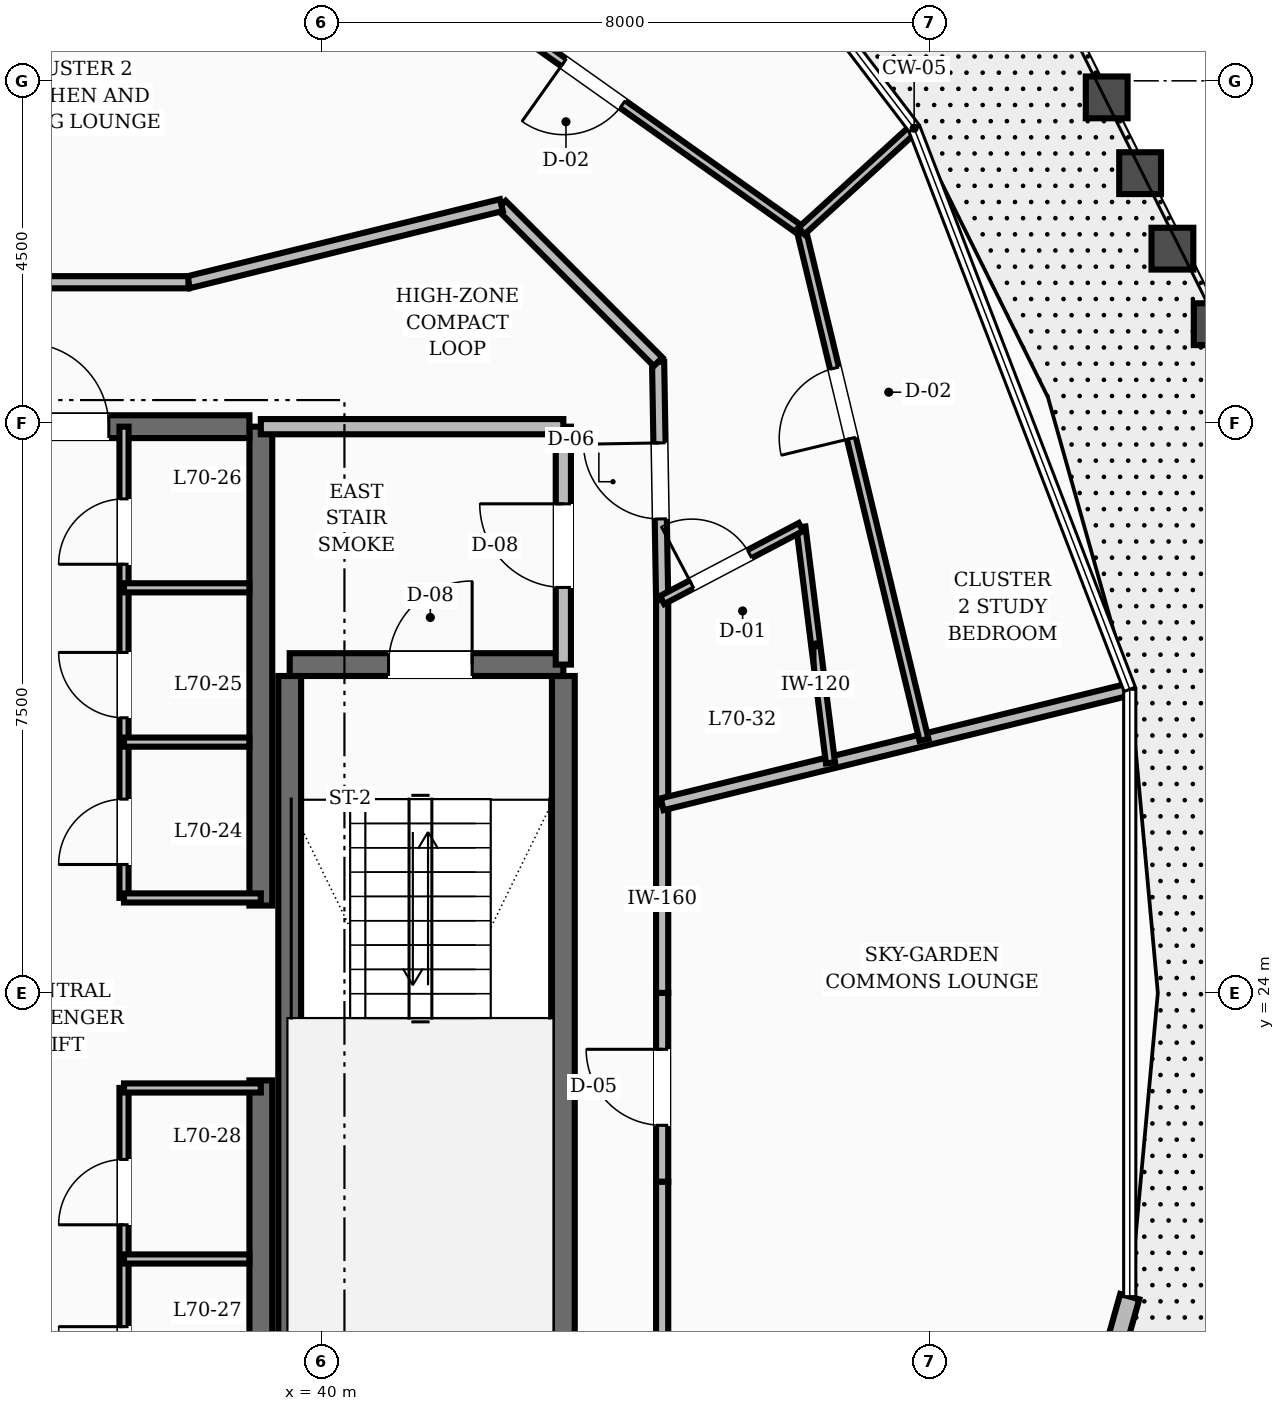
"""IFC4 building model, lengths in metres.
Left out: names, types, materials, properties, quantities, classifications, styles, units other than length and angle.
Written with IfcOpenShell. Run it as: python <this file> out.ifc"""

import sys

from ifc_helpers import new_model, si_unit, direction, frame, frame_2d, origin, place, context, subcontext, project, spatial, rectangle, extrude, element, fill, save


model = new_model("IFC4")
c1 = context("Model", 3, precision=1e-05, world=origin(), true_north=direction((0.0, 1.0)))
c2 = subcontext(c1, "Body", "Model", "MODEL_VIEW")
j1 = project(units=[si_unit("LENGTHUNIT", "METRE"), si_unit("PLANEANGLEUNIT", "RADIAN")], contexts=[c1])
p1 = place(None, origin())
s1 = spatial("IfcSite", under=j1, at=p1, CompositionType="ELEMENT")
p2 = place(p1, origin())
s2 = spatial("IfcBuilding", under=s1, at=p2, CompositionType="ELEMENT")
p3 = place(p2, frame((0.0, 0.0, 268.8)))
s3 = spatial("IfcBuildingStorey", under=s2, at=p3, CompositionType="ELEMENT", Elevation=268.8)
for number, where, z_axis, x_axis in (
    (1, (39.2, 16.55, 0.0), (0.0, 0.0, 1.0), (0.0, 1.0, 0.0)),
    (2, (39.2, 25.15, 0.0), (0.0, 0.0, 1.0), (0.0, 1.0, 0.0)),
):
    element("IfcWall", number, at=place(p3, frame(where, z_axis=z_axis, x_axis=x_axis)), inside=s3, PredefinedType="SHEAR", context=c2, shape_type="SweptSolid", body=[
        extrude(rectangle(XDim=6.3, YDim=0.3, at=frame_2d((3.15, 0.0))), origin(), (0.0, 0.0, 1.0), 3.6),
    ])
p4 = place(p3, frame((35.8, 31.45, 0.0), z_axis=(0.0, 0.0, 1.0), x_axis=(1.0, 0.0, 0.0)))
e3 = element("IfcWall", 3, at=p4, inside=s3, PredefinedType="SHEAR", context=c2, shape_type="SweptSolid", body=[
    extrude(rectangle(XDim=3.25, YDim=0.3, at=frame_2d((1.625, 0.0))), origin(), (0.0, 0.0, 1.0), 3.6),
])
p5 = place(p4, frame((0.3, 0.0, 0.0)))
e4 = element("IfcOpeningElement", 4, at=p5, cuts=e3, PredefinedType="OPENING", context=c2, shape_type="SweptSolid", body=[
    extrude(rectangle(XDim=1.1, YDim=2.1, at=frame_2d((0.55, 1.05))), frame((0.0, 0.16, 0.0), z_axis=(0.0, -1.0, 0.0), x_axis=(1.0, 0.0, 0.0)), (0.0, 0.0, 1.0), 0.32),
])
for number, where, z_axis, x_axis in (
    (5, (43.18, 19.43, 0.0), (0.0, 0.0, 1.0), (0.0, 1.0, 0.0)),
    (6, (39.58, 19.43, 0.0), (0.0, 0.0, 1.0), (0.0, 1.0, 0.0)),
):
    element("IfcWall", number, at=place(p3, frame(where, z_axis=z_axis, x_axis=x_axis)), inside=s3, PredefinedType="SHEAR", context=c2, shape_type="SweptSolid", body=[
        extrude(rectangle(XDim=8.74, YDim=0.3, at=frame_2d((4.37, 0.0))), origin(), (0.0, 0.0, 1.0), 3.6),
    ])
p6 = place(p3, frame((39.58, 28.32, 0.0), z_axis=(0.0, 0.0, 1.0), x_axis=(1.0, 0.0, 0.0)))
e7 = element("IfcWall", 7, at=p6, inside=s3, PredefinedType="SHEAR", context=c2, shape_type="SweptSolid", body=[
    extrude(rectangle(XDim=3.6, YDim=0.3, at=frame_2d((1.8, 0.0))), origin(), (0.0, 0.0, 1.0), 3.6),
])
p7 = place(p6, frame((1.3, 0.0, 0.0)))
e8 = element("IfcOpeningElement", 8, at=p7, cuts=e7, PredefinedType="OPENING", context=c2, shape_type="SweptSolid", body=[
    extrude(rectangle(XDim=1.1, YDim=2.1, at=frame_2d((0.55, 1.05))), frame((0.0, 0.16, 0.0), z_axis=(0.0, -1.0, 0.0), x_axis=(1.0, 0.0, 0.0)), (0.0, 0.0, 1.0), 0.32),
])
p8 = place(p3, frame((49.551, 16.164, 0.0), z_axis=(0.0, 0.0, 1.0), x_axis=(0.270905028763, 0.962606080072, 0.0)))
e9 = element("IfcWall", 9, at=p8, inside=s3, PredefinedType="STANDARD", context=c2, shape_type="SweptSolid", body=[
    extrude(rectangle(XDim=3.99, YDim=0.26, at=frame_2d((1.995, 0.0))), origin(), (0.0, 0.0, 1.0), 2.88),
])
p9 = place(p8, frame((1.395, 0.0, 0.0)))
e10 = element("IfcOpeningElement", 10, at=p9, cuts=e9, PredefinedType="OPENING", context=c2, shape_type="SweptSolid", body=[
    extrude(rectangle(XDim=1.2, YDim=2.15, at=frame_2d((0.6, 1.075))), frame((0.0, 0.14, 0.0), z_axis=(0.0, -1.0, 0.0), x_axis=(1.0, 0.0, 0.0)), (0.0, 0.0, 1.0), 0.28),
])
p10 = place(p3, frame((43.18, 28.32, 0.0), z_axis=(0.0, 0.0, 1.0), x_axis=(0.0, 1.0, 0.0)))
e11 = element("IfcWall", 11, at=p10, inside=s3, PredefinedType="SOLIDWALL", context=c2, shape_type="SweptSolid", body=[
    extrude(rectangle(XDim=3.13, YDim=0.2, at=frame_2d((1.565, 0.0))), origin(), (0.0, 0.0, 1.0), 2.87),
])
p11 = place(p10, frame((1.015, 0.0, 0.0)))
e12 = element("IfcOpeningElement", 12, at=p11, cuts=e11, PredefinedType="OPENING", context=c2, shape_type="SweptSolid", body=[
    extrude(rectangle(XDim=1.1, YDim=2.1, at=frame_2d((0.55, 1.05))), frame((0.0, 0.11, 0.0), z_axis=(0.0, -1.0, 0.0), x_axis=(1.0, 0.0, 0.0)), (0.0, 0.0, 1.0), 0.22),
])
p12 = place(p3, frame((39.2, 31.45, 0.0), z_axis=(0.0, 0.0, 1.0), x_axis=(1.0, 0.0, 0.0)))
e13 = element("IfcWall", 13, at=p12, inside=s3, PredefinedType="SOLIDWALL", context=c2, shape_type="SweptSolid", body=[
    extrude(rectangle(XDim=3.98, YDim=0.2, at=frame_2d((1.99, 0.0))), origin(), (0.0, 0.0, 1.0), 2.87),
])
p13 = place(p3, frame((37.4, 25.25, 0.0), z_axis=(0.0, 0.0, 1.0), x_axis=(0.0, 1.0, 0.0)))
e14 = element("IfcWall", 14, at=p13, inside=s3, PredefinedType="PARTITIONING", context=c2, shape_type="SweptSolid", body=[
    extrude(rectangle(XDim=6.2, YDim=0.12, at=frame_2d((3.1, 0.0))), origin(), (0.0, 0.0, 1.0), 2.87),
])
p14 = place(p13, frame((0.44, 0.0, 0.0)))
e15 = element("IfcOpeningElement", 15, at=p14, cuts=e14, PredefinedType="OPENING", context=c2, shape_type="SweptSolid", body=[
    extrude(rectangle(XDim=0.86, YDim=2.1, at=frame_2d((0.43, 1.05))), frame((0.0, 0.07, 0.0), z_axis=(0.0, -1.0, 0.0), x_axis=(1.0, 0.0, 0.0)), (0.0, 0.0, 1.0), 0.14),
])
p15 = place(p13, frame((2.37, 0.0, 0.0)))
e16 = element("IfcOpeningElement", 16, at=p15, cuts=e14, PredefinedType="OPENING", context=c2, shape_type="SweptSolid", body=[
    extrude(rectangle(XDim=0.86, YDim=2.1, at=frame_2d((0.43, 1.05))), frame((0.0, 0.07, 0.0), z_axis=(0.0, -1.0, 0.0), x_axis=(1.0, 0.0, 0.0)), (0.0, 0.0, 1.0), 0.14),
])
p16 = place(p13, frame((4.39, 0.0, 0.0)))
e17 = element("IfcOpeningElement", 17, at=p16, cuts=e14, PredefinedType="OPENING", context=c2, shape_type="SweptSolid", body=[
    extrude(rectangle(XDim=0.86, YDim=2.1, at=frame_2d((0.43, 1.05))), frame((0.0, 0.07, 0.0), z_axis=(0.0, -1.0, 0.0), x_axis=(1.0, 0.0, 0.0)), (0.0, 0.0, 1.0), 0.14),
])
p17 = place(p3, frame((37.4, 25.25, 0.0), z_axis=(0.0, 0.0, 1.0), x_axis=(1.0, 0.0, 0.0)))
e18 = element("IfcWall", 18, at=p17, inside=s3, PredefinedType="PARTITIONING", context=c2, shape_type="SweptSolid", body=[
    extrude(rectangle(XDim=1.8, YDim=0.12, at=frame_2d((0.9, 0.0))), origin(), (0.0, 0.0, 1.0), 2.87),
])
p18 = place(p3, frame((37.4, 18.3, 0.0), z_axis=(0.0, 0.0, 1.0), x_axis=(0.0, 1.0, 0.0)))
e19 = element("IfcWall", 19, at=p18, inside=s3, PredefinedType="PARTITIONING", context=c2, shape_type="SweptSolid", body=[
    extrude(rectangle(XDim=4.45, YDim=0.12, at=frame_2d((2.225, 0.0))), origin(), (0.0, 0.0, 1.0), 2.87),
])
p19 = place(p18, frame((0.45, 0.0, 0.0)))
e20 = element("IfcOpeningElement", 20, at=p19, cuts=e19, PredefinedType="OPENING", context=c2, shape_type="SweptSolid", body=[
    extrude(rectangle(XDim=0.86, YDim=2.1, at=frame_2d((0.43, 1.05))), frame((0.0, 0.07, 0.0), z_axis=(0.0, -1.0, 0.0), x_axis=(1.0, 0.0, 0.0)), (0.0, 0.0, 1.0), 0.14),
])
p20 = place(p18, frame((2.65, 0.0, 0.0)))
e21 = element("IfcOpeningElement", 21, at=p20, cuts=e19, PredefinedType="OPENING", context=c2, shape_type="SweptSolid", body=[
    extrude(rectangle(XDim=0.86, YDim=2.1, at=frame_2d((0.43, 1.05))), frame((0.0, 0.07, 0.0), z_axis=(0.0, -1.0, 0.0), x_axis=(1.0, 0.0, 0.0)), (0.0, 0.0, 1.0), 0.14),
])
p21 = place(p3, frame((37.4, 22.75, 0.0), z_axis=(0.0, 0.0, 1.0), x_axis=(1.0, 0.0, 0.0)))
e22 = element("IfcWall", 22, at=p21, inside=s3, PredefinedType="PARTITIONING", context=c2, shape_type="SweptSolid", body=[
    extrude(rectangle(XDim=1.8, YDim=0.12, at=frame_2d((0.9, 0.0))), origin(), (0.0, 0.0, 1.0), 2.87),
])
for number, where, z_axis, x_axis in (
    (23, (37.4, 27.3, 0.0), (0.0, 0.0, 1.0), (1.0, 0.0, 0.0)),
    (24, (37.4, 29.33, 0.0), (0.0, 0.0, 1.0), (1.0, 0.0, 0.0)),
    (25, (37.4, 20.5, 0.0), (0.0, 0.0, 1.0), (1.0, 0.0, 0.0)),
):
    element("IfcWall", number, at=place(p3, frame(where, z_axis=z_axis, x_axis=x_axis)), inside=s3, PredefinedType="PARTITIONING", context=c2, shape_type="SweptSolid", body=[
        extrude(rectangle(XDim=1.65, YDim=0.12, at=frame_2d((0.825, 0.0))), origin(), (0.0, 0.0, 1.0), 2.87),
    ])
p22 = place(p3, frame((44.48, 24.0, 0.0), z_axis=(0.0, 0.0, 1.0), x_axis=(0.0, 1.0, 0.0)))
e26 = element("IfcWall", 26, at=p22, inside=s3, PredefinedType="SOLIDWALL", context=c2, shape_type="SweptSolid", body=[
    extrude(rectangle(XDim=2.482, YDim=0.16, at=frame_2d((1.241, 0.0))), origin(), (0.0, 0.0, 1.0), 2.87),
])
p23 = place(p3, frame((44.48, 26.482, 0.0), z_axis=(0.0, 0.0, 1.0), x_axis=(0.0, 1.0, 0.0)))
e27 = element("IfcWall", 27, at=p23, inside=s3, PredefinedType="SOLIDWALL", context=c2, shape_type="SweptSolid", body=[
    extrude(rectangle(XDim=2.687, YDim=0.16, at=frame_2d((1.344, 0.0))), origin(), (0.0, 0.0, 1.0), 2.87),
])
p24 = place(p3, frame((44.48, 29.169, 0.0), z_axis=(0.0, 0.0, 1.0), x_axis=(-0.016981035134, 0.999855811828, 0.0)))
e28 = element("IfcWall", 28, at=p24, inside=s3, PredefinedType="SOLIDWALL", context=c2, shape_type="SweptSolid", body=[
    extrude(rectangle(XDim=3.134, YDim=0.16, at=frame_2d((1.567, 0.0))), origin(), (0.0, 0.0, 1.0), 2.87),
])
p25 = place(p24, frame((1.067, 0.0, 0.0)))
e29 = element("IfcOpeningElement", 29, at=p25, cuts=e28, PredefinedType="OPENING", context=c2, shape_type="SweptSolid", body=[
    extrude(rectangle(XDim=1.0, YDim=2.1, at=frame_2d((0.5, 1.05))), frame((0.0, 0.09, 0.0), z_axis=(0.0, -1.0, 0.0), x_axis=(1.0, 0.0, 0.0)), (0.0, 0.0, 1.0), 0.18),
])
p26 = place(p3, frame((44.427, 32.303, 0.0), z_axis=(0.0, 0.0, 1.0), x_axis=(-0.707106781187, 0.707106781187, 0.0)))
e30 = element("IfcWall", 30, at=p26, inside=s3, PredefinedType="SOLIDWALL", context=c2, shape_type="SweptSolid", body=[
    extrude(rectangle(XDim=2.916, YDim=0.16, at=frame_2d((1.458, 0.0))), origin(), (0.0, 0.0, 1.0), 2.87),
])
p27 = place(p3, frame((42.365, 34.365, 0.0), z_axis=(0.0, 0.0, 1.0), x_axis=(-0.970939799552, -0.239323850978, 0.0)))
e31 = element("IfcWall", 31, at=p27, inside=s3, PredefinedType="SOLIDWALL", context=c2, shape_type="SweptSolid", body=[
    extrude(rectangle(XDim=4.241, YDim=0.16, at=frame_2d((2.12, 0.0))), origin(), (0.0, 0.0, 1.0), 2.87),
])
p28 = place(p3, frame((38.248, 33.35, 0.0), z_axis=(0.0, 0.0, 1.0), x_axis=(-1.0, 0.0, 0.0)))
e32 = element("IfcWall", 32, at=p28, inside=s3, PredefinedType="SOLIDWALL", context=c2, shape_type="SweptSolid", body=[
    extrude(rectangle(XDim=2.375, YDim=0.16, at=frame_2d((1.188, 0.0))), origin(), (0.0, 0.0, 1.0), 2.87),
])
p29 = place(p3, frame((44.48, 18.831, 0.0), z_axis=(0.0, 0.0, 1.0), x_axis=(0.0, 1.0, 0.0)))
e33 = element("IfcWall", 33, at=p29, inside=s3, PredefinedType="SOLIDWALL", context=c2, shape_type="SweptSolid", body=[
    extrude(rectangle(XDim=2.687, YDim=0.16, at=frame_2d((1.344, 0.0))), origin(), (0.0, 0.0, 1.0), 2.87),
])
p30 = place(p3, frame((44.48, 21.518, 0.0), z_axis=(0.0, 0.0, 1.0), x_axis=(0.0, 1.0, 0.0)))
e34 = element("IfcWall", 34, at=p30, inside=s3, PredefinedType="SOLIDWALL", context=c2, shape_type="SweptSolid", body=[
    extrude(rectangle(XDim=2.482, YDim=0.16, at=frame_2d((1.241, 0.0))), origin(), (0.0, 0.0, 1.0), 2.87),
])
p31 = place(p30, frame((0.741, 0.0, 0.0)))
e35 = element("IfcOpeningElement", 35, at=p31, cuts=e34, PredefinedType="OPENING", context=c2, shape_type="SweptSolid", body=[
    extrude(rectangle(XDim=1.0, YDim=2.1, at=frame_2d((0.5, 1.05))), frame((0.0, 0.09, 0.0), z_axis=(0.0, -1.0, 0.0), x_axis=(1.0, 0.0, 0.0)), (0.0, 0.0, 1.0), 0.18),
])
p32 = place(p3, frame((44.48, 26.482, 0.0), z_axis=(0.0, 0.0, 1.0), x_axis=(0.971083357224, 0.238740682167, 0.0)))
e36 = element("IfcWall", 36, at=p32, inside=s3, PredefinedType="SOLIDWALL", context=c2, shape_type="SweptSolid", body=[
    extrude(rectangle(XDim=6.285, YDim=0.16, at=frame_2d((3.143, 0.0))), origin(), (0.0, 0.0, 1.0), 2.87),
])
p33 = place(p3, frame((46.695, 27.027, 0.0), z_axis=(0.0, 0.0, 1.0), x_axis=(-0.124457549866, 0.99222493331, 0.0)))
e37 = element("IfcWall", 37, at=p33, inside=s3, PredefinedType="PARTITIONING", context=c2, shape_type="SweptSolid", body=[
    extrude(rectangle(XDim=3.127, YDim=0.12, at=frame_2d((1.563, 0.0))), origin(), (0.0, 0.0, 1.0), 2.87),
])
p34 = place(p3, frame((44.48, 29.169, 0.0), z_axis=(0.0, 0.0, 1.0), x_axis=(0.885077371256, 0.465443924539, 0.0)))
e38 = element("IfcWall", 38, at=p34, inside=s3, PredefinedType="PARTITIONING", context=c2, shape_type="SweptSolid", body=[
    extrude(rectangle(XDim=2.062, YDim=0.12, at=frame_2d((1.031, 0.0))), origin(), (0.0, 0.0, 1.0), 2.87),
])
p35 = place(p34, frame((0.44, 0.0, 0.0)))
e39 = element("IfcOpeningElement", 39, at=p35, cuts=e38, PredefinedType="OPENING", context=c2, shape_type="SweptSolid", body=[
    extrude(rectangle(XDim=0.86, YDim=2.1, at=frame_2d((0.43, 1.05))), frame((0.0, 0.07, 0.0), z_axis=(0.0, -1.0, 0.0), x_axis=(1.0, 0.0, 0.0)), (0.0, 0.0, 1.0), 0.14),
])
p36 = place(p3, frame((47.925, 27.329, 0.0), z_axis=(0.0, 0.0, 1.0), x_axis=(-0.234101002683, 0.972212281625, 0.0)))
e40 = element("IfcWall", 40, at=p36, inside=s3, PredefinedType="PARTITIONING", context=c2, shape_type="SweptSolid", body=[
    extrude(rectangle(XDim=6.886, YDim=0.12, at=frame_2d((3.443, 0.0))), origin(), (0.0, 0.0, 1.0), 2.87),
])
p37 = place(p36, frame((4.08, 0.0, 0.0)))
e41 = element("IfcOpeningElement", 41, at=p37, cuts=e40, PredefinedType="OPENING", context=c2, shape_type="SweptSolid", body=[
    extrude(rectangle(XDim=0.95, YDim=2.1, at=frame_2d((0.475, 1.05))), frame((0.0, 0.07, 0.0), z_axis=(0.0, -1.0, 0.0), x_axis=(1.0, 0.0, 0.0)), (0.0, 0.0, 1.0), 0.14),
])
p38 = place(p3, frame((46.313, 34.024, 0.0), z_axis=(0.0, 0.0, 1.0), x_axis=(-0.815764383374, 0.57838436253, 0.0)))
e42 = element("IfcWall", 42, at=p38, inside=s3, PredefinedType="PARTITIONING", context=c2, shape_type="SweptSolid", body=[
    extrude(rectangle(XDim=6.717, YDim=0.12, at=frame_2d((3.358, 0.0))), origin(), (0.0, 0.0, 1.0), 2.87),
])
p39 = place(p38, frame((2.884, 0.0, 0.0)))
e43 = element("IfcOpeningElement", 43, at=p39, cuts=e42, PredefinedType="OPENING", context=c2, shape_type="SweptSolid", body=[
    extrude(rectangle(XDim=0.95, YDim=2.1, at=frame_2d((0.475, 1.05))), frame((0.0, 0.07, 0.0), z_axis=(0.0, -1.0, 0.0), x_axis=(1.0, 0.0, 0.0)), (0.0, 0.0, 1.0), 0.14),
])
p40 = place(p3, frame((46.313, 34.024, 0.0), z_axis=(0.0, 0.0, 1.0), x_axis=(0.738747493853, 0.673982299713, 0.0)))
e44 = element("IfcWall", 44, at=p40, inside=s3, PredefinedType="PARTITIONING", context=c2, shape_type="SweptSolid", body=[
    extrude(rectangle(XDim=1.957, YDim=0.12, at=frame_2d((0.978, 0.0))), origin(), (0.0, 0.0, 1.0), 2.87),
])
p41 = place(p7, origin())
e45 = element("IfcDoor", 45, at=p41, inside=s3, OperationType="SINGLE_SWING_RIGHT", PredefinedType="DOOR", context=c2, shape_type="SweptSolid", body=[
    extrude(rectangle(XDim=1.1, YDim=2.1, at=frame_2d((0.55, 1.05))), frame((0.0, 0.025, 0.0), z_axis=(0.0, -1.0, 0.0), x_axis=(1.0, 0.0, 0.0)), (0.0, 0.0, 1.0), 0.05),
])
fill(e8, e45)
p42 = place(p11, origin())
e46 = element("IfcDoor", 46, at=p42, inside=s3, OperationType="SINGLE_SWING_RIGHT", PredefinedType="DOOR", context=c2, shape_type="SweptSolid", body=[
    extrude(rectangle(XDim=1.1, YDim=2.1, at=frame_2d((0.55, 1.05))), frame((0.0, 0.025, 0.0), z_axis=(0.0, -1.0, 0.0), x_axis=(1.0, 0.0, 0.0)), (0.0, 0.0, 1.0), 0.05),
])
fill(e12, e46)
p43 = place(p5, origin())
e47 = element("IfcDoor", 47, at=p43, inside=s3, OperationType="SINGLE_SWING_LEFT", PredefinedType="DOOR", context=c2, shape_type="SweptSolid", body=[
    extrude(rectangle(XDim=1.1, YDim=2.1, at=frame_2d((0.55, 1.05))), frame((0.0, 0.025, 0.0), z_axis=(0.0, -1.0, 0.0), x_axis=(1.0, 0.0, 0.0)), (0.0, 0.0, 1.0), 0.05),
])
fill(e4, e47)
p44 = place(p14, origin())
e48 = element("IfcDoor", 48, at=p44, inside=s3, OperationType="SINGLE_SWING_LEFT", PredefinedType="DOOR", context=c2, shape_type="SweptSolid", body=[
    extrude(rectangle(XDim=0.86, YDim=2.1, at=frame_2d((0.43, 1.05))), frame((0.0, 0.025, 0.0), z_axis=(0.0, -1.0, 0.0), x_axis=(1.0, 0.0, 0.0)), (0.0, 0.0, 1.0), 0.05),
])
fill(e15, e48)
p45 = place(p15, origin())
e49 = element("IfcDoor", 49, at=p45, inside=s3, OperationType="SINGLE_SWING_RIGHT", PredefinedType="DOOR", context=c2, shape_type="SweptSolid", body=[
    extrude(rectangle(XDim=0.86, YDim=2.1, at=frame_2d((0.43, 1.05))), frame((0.0, 0.025, 0.0), z_axis=(0.0, -1.0, 0.0), x_axis=(1.0, 0.0, 0.0)), (0.0, 0.0, 1.0), 0.05),
])
fill(e16, e49)
p46 = place(p16, origin())
e50 = element("IfcDoor", 50, at=p46, inside=s3, OperationType="SINGLE_SWING_LEFT", PredefinedType="DOOR", context=c2, shape_type="SweptSolid", body=[
    extrude(rectangle(XDim=0.86, YDim=2.1, at=frame_2d((0.43, 1.05))), frame((0.0, 0.025, 0.0), z_axis=(0.0, -1.0, 0.0), x_axis=(1.0, 0.0, 0.0)), (0.0, 0.0, 1.0), 0.05),
])
fill(e17, e50)
p47 = place(p19, origin())
e51 = element("IfcDoor", 51, at=p47, inside=s3, OperationType="SINGLE_SWING_RIGHT", PredefinedType="DOOR", context=c2, shape_type="SweptSolid", body=[
    extrude(rectangle(XDim=0.86, YDim=2.1, at=frame_2d((0.43, 1.05))), frame((0.0, 0.025, 0.0), z_axis=(0.0, -1.0, 0.0), x_axis=(1.0, 0.0, 0.0)), (0.0, 0.0, 1.0), 0.05),
])
fill(e20, e51)
p48 = place(p20, origin())
e52 = element("IfcDoor", 52, at=p48, inside=s3, OperationType="SINGLE_SWING_LEFT", PredefinedType="DOOR", context=c2, shape_type="SweptSolid", body=[
    extrude(rectangle(XDim=0.86, YDim=2.1, at=frame_2d((0.43, 1.05))), frame((0.0, 0.025, 0.0), z_axis=(0.0, -1.0, 0.0), x_axis=(1.0, 0.0, 0.0)), (0.0, 0.0, 1.0), 0.05),
])
fill(e21, e52)
p49 = place(p31, origin())
e53 = element("IfcDoor", 53, at=p49, inside=s3, OperationType="SINGLE_SWING_RIGHT", PredefinedType="DOOR", context=c2, shape_type="SweptSolid", body=[
    extrude(rectangle(XDim=1.0, YDim=2.1, at=frame_2d((0.5, 1.05))), frame((0.0, 0.025, 0.0), z_axis=(0.0, -1.0, 0.0), x_axis=(1.0, 0.0, 0.0)), (0.0, 0.0, 1.0), 0.05),
])
fill(e35, e53)
p50 = place(p35, origin())
e54 = element("IfcDoor", 54, at=p50, inside=s3, OperationType="SINGLE_SWING_LEFT", PredefinedType="DOOR", context=c2, shape_type="SweptSolid", body=[
    extrude(rectangle(XDim=0.86, YDim=2.1, at=frame_2d((0.43, 1.05))), frame((0.0, 0.025, 0.0), z_axis=(0.0, -1.0, 0.0), x_axis=(1.0, 0.0, 0.0)), (0.0, 0.0, 1.0), 0.05),
])
fill(e39, e54)
p51 = place(p25, origin())
e55 = element("IfcDoor", 55, at=p51, inside=s3, OperationType="SINGLE_SWING_RIGHT", PredefinedType="DOOR", context=c2, shape_type="SweptSolid", body=[
    extrude(rectangle(XDim=1.0, YDim=2.1, at=frame_2d((0.5, 1.05))), frame((0.0, 0.025, 0.0), z_axis=(0.0, -1.0, 0.0), x_axis=(1.0, 0.0, 0.0)), (0.0, 0.0, 1.0), 0.05),
])
fill(e29, e55)
p52 = place(p37, origin())
e56 = element("IfcDoor", 56, at=p52, inside=s3, OperationType="SINGLE_SWING_LEFT", PredefinedType="DOOR", context=c2, shape_type="SweptSolid", body=[
    extrude(rectangle(XDim=0.95, YDim=2.1, at=frame_2d((0.475, 1.05))), frame((0.0, 0.025, 0.0), z_axis=(0.0, -1.0, 0.0), x_axis=(1.0, 0.0, 0.0)), (0.0, 0.0, 1.0), 0.05),
])
fill(e41, e56)
p53 = place(p39, origin())
e57 = element("IfcDoor", 57, at=p53, inside=s3, OperationType="SINGLE_SWING_RIGHT", PredefinedType="DOOR", context=c2, shape_type="SweptSolid", body=[
    extrude(rectangle(XDim=0.95, YDim=2.1, at=frame_2d((0.475, 1.05))), frame((0.0, 0.025, 0.0), z_axis=(0.0, -1.0, 0.0), x_axis=(1.0, 0.0, 0.0)), (0.0, 0.0, 1.0), 0.05),
])
fill(e43, e57)
save(model, sys.argv[1])
